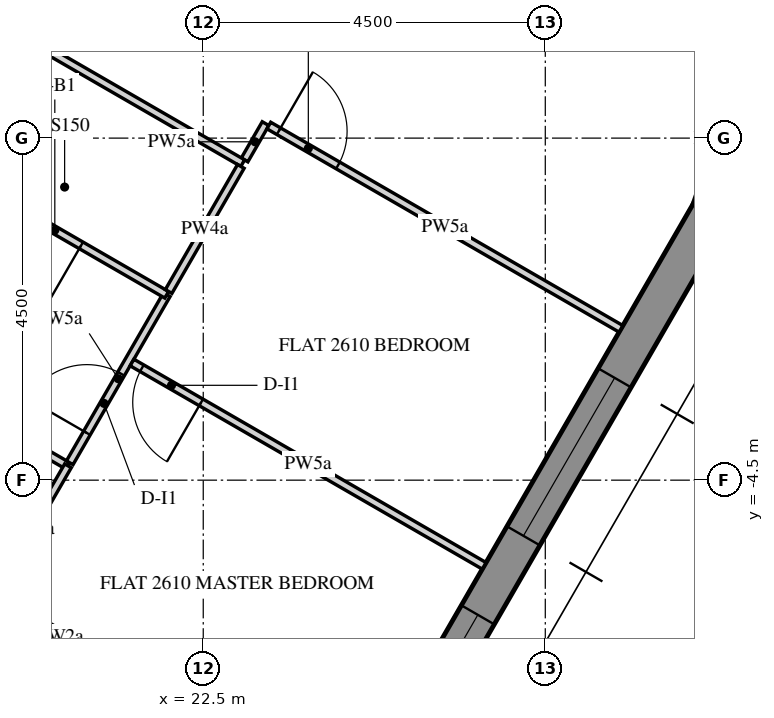
"""IFC4 building model, lengths in metres.
Left out: names, types, materials, properties, quantities, classifications, styles, units other than length and angle.
Written with IfcOpenShell. Run it as: python <this file> out.ifc"""

import sys

from ifc_helpers import new_model, si_unit, direction, frame, frame_2d, origin, place, context, subcontext, project, spatial, polyline, rectangle, outline, extrude, element, fill, save


model = new_model("IFC4")
c1 = context("Model", 3, precision=1e-05, world=origin(), true_north=direction((0.0, 1.0)))
c2 = subcontext(c1, "Body", "Model", "MODEL_VIEW")
j1 = project(units=[si_unit("LENGTHUNIT", "METRE"), si_unit("PLANEANGLEUNIT", "RADIAN")], contexts=[c1])
p1 = place(None, origin())
s1 = spatial("IfcSite", under=j1, at=p1, CompositionType="ELEMENT")
p2 = place(p1, origin())
s2 = spatial("IfcBuilding", under=s1, at=p2, CompositionType="ELEMENT")
p3 = place(p2, frame((0.0, 0.0, 334.2)))
s3 = spatial("IfcBuildingStorey", under=s2, at=p3, CompositionType="ELEMENT", Elevation=334.2)
p4 = place(p3, frame((16.451, -23.005, -0.15), z_axis=(0.0, 0.0, 1.0), x_axis=(0.500003737743, 0.866023245787, 0.0)))
e1 = element("IfcWall", 1, at=p4, inside=s3, PredefinedType="SOLIDWALL", context=c2, shape_type="SweptSolid", body=[
    extrude(outline(polyline([(-0.021, -0.25), (25.468, -0.25), (25.421, 0.25), (0.021, 0.25), (-0.021, -0.25)])), origin(), (0.0, 0.0, 1.0), 3.75),
])
p5 = place(p4, frame((2.522, 0.0, 0.75)))
e2 = element("IfcOpeningElement", 2, at=p5, cuts=e1, PredefinedType="OPENING", context=c2, shape_type="SweptSolid", body=[
    extrude(rectangle(XDim=2.4, YDim=2.7, at=frame_2d((1.2, 1.35))), frame((0.0, 0.26, 0.0), z_axis=(0.0, -1.0, 0.0), x_axis=(1.0, 0.0, 0.0)), (0.0, 0.0, 1.0), 0.52),
])
p6 = place(p4, frame((6.122, 0.0, 0.75)))
e3 = element("IfcOpeningElement", 3, at=p6, cuts=e1, PredefinedType="OPENING", context=c2, shape_type="SweptSolid", body=[
    extrude(rectangle(XDim=2.4, YDim=2.7, at=frame_2d((1.2, 1.35))), frame((0.0, 0.26, 0.0), z_axis=(0.0, -1.0, 0.0), x_axis=(1.0, 0.0, 0.0)), (0.0, 0.0, 1.0), 0.52),
])
p7 = place(p4, frame((9.722, 0.0, 0.75)))
e4 = element("IfcOpeningElement", 4, at=p7, cuts=e1, PredefinedType="OPENING", context=c2, shape_type="SweptSolid", body=[
    extrude(rectangle(XDim=2.4, YDim=2.7, at=frame_2d((1.2, 1.35))), frame((0.0, 0.26, 0.0), z_axis=(0.0, -1.0, 0.0), x_axis=(1.0, 0.0, 0.0)), (0.0, 0.0, 1.0), 0.52),
])
p8 = place(p4, frame((13.323, 0.0, 0.75)))
e5 = element("IfcOpeningElement", 5, at=p8, cuts=e1, PredefinedType="OPENING", context=c2, shape_type="SweptSolid", body=[
    extrude(rectangle(XDim=2.4, YDim=2.7, at=frame_2d((1.2, 1.35))), frame((0.0, 0.26, 0.0), z_axis=(0.0, -1.0, 0.0), x_axis=(1.0, 0.0, 0.0)), (0.0, 0.0, 1.0), 0.52),
])
p9 = place(p4, frame((16.922, 0.0, 0.75)))
e6 = element("IfcOpeningElement", 6, at=p9, cuts=e1, PredefinedType="OPENING", context=c2, shape_type="SweptSolid", body=[
    extrude(rectangle(XDim=2.4, YDim=2.7, at=frame_2d((1.2, 1.35))), frame((0.0, 0.26, 0.0), z_axis=(0.0, -1.0, 0.0), x_axis=(1.0, 0.0, 0.0)), (0.0, 0.0, 1.0), 0.52),
])
p10 = place(p4, frame((20.522, 0.0, 0.75)))
e7 = element("IfcOpeningElement", 7, at=p10, cuts=e1, PredefinedType="OPENING", context=c2, shape_type="SweptSolid", body=[
    extrude(rectangle(XDim=2.4, YDim=2.7, at=frame_2d((1.2, 1.35))), frame((0.0, 0.26, 0.0), z_axis=(0.0, -1.0, 0.0), x_axis=(1.0, 0.0, 0.0)), (0.0, 0.0, 1.0), 0.52),
])
p11 = place(p3, frame((29.174, -0.97, -0.15), z_axis=(0.0, 0.0, 1.0), x_axis=(0.330961348063, 0.943644311215, 0.0)))
e8 = element("IfcWall", 8, at=p11, inside=s3, PredefinedType="SOLIDWALL", context=c2, shape_type="SweptSolid", body=[
    extrude(outline(polyline([(-0.023, -0.25), (1.435, -0.25), (1.341, 0.25), (0.023, 0.25), (-0.023, -0.25)])), origin(), (0.0, 0.0, 1.0), 3.75),
])
p12 = place(p3, frame((24.396, -8.745, 0.0), z_axis=(0.0, 0.0, 1.0), x_axis=(-0.866018297078, 0.500012308975, 0.0)))
e9 = element("IfcWall", 9, at=p12, inside=s3, PredefinedType="PARTITIONING", context=c2, shape_type="SweptSolid", body=[
    extrude(rectangle(XDim=8.725, YDim=0.18, at=frame_2d((4.362, 0.0))), origin(), (0.0, 0.0, 1.0), 2.838),
])
p13 = place(p3, frame((23.043, -0.287, 0.0), z_axis=(0.0, 0.0, 1.0), x_axis=(0.500181810019, 0.865920410272, 0.0)))
e10 = element("IfcWall", 10, at=p13, inside=s3, PredefinedType="PARTITIONING", context=c2, shape_type="SweptSolid", body=[
    extrude(rectangle(XDim=0.552, YDim=0.1, at=frame_2d((0.276, 0.0))), origin(), (0.0, 0.0, 1.0), 2.838),
])
p14 = place(p3, frame((23.363, 0.166, 0.0), z_axis=(0.0, 0.0, 1.0), x_axis=(0.866024483152, -0.500001594578, 0.0)))
e11 = element("IfcWall", 11, at=p14, inside=s3, PredefinedType="PARTITIONING", context=c2, shape_type="SweptSolid", body=[
    extrude(rectangle(XDim=5.35, YDim=0.1, at=frame_2d((2.675, 0.0))), origin(), (0.0, 0.0, 1.0), 2.838),
])
p15 = place(p14, frame((0.15, 0.0, 0.0)))
e12 = element("IfcOpeningElement", 12, at=p15, cuts=e11, PredefinedType="OPENING", context=c2, shape_type="SweptSolid", body=[
    extrude(rectangle(XDim=0.9, YDim=2.1, at=frame_2d((0.45, 1.05))), frame((0.0, 0.06, 0.0), z_axis=(0.0, -1.0, 0.0), x_axis=(1.0, 0.0, 0.0)), (0.0, 0.0, 1.0), 0.12),
])
p16 = place(p3, frame((14.896, 4.361, 0.0), z_axis=(0.0, 0.0, 1.0), x_axis=(0.866020874699, -0.500007844523, 0.0)))
e13 = element("IfcWall", 13, at=p16, inside=s3, PredefinedType="PARTITIONING", context=c2, shape_type="SweptSolid", body=[
    extrude(rectangle(XDim=9.38, YDim=0.1, at=frame_2d((4.69, 0.0))), origin(), (0.0, 0.0, 1.0), 2.838),
])
p17 = place(p3, frame((17.84, -2.65, 0.0), z_axis=(0.0, 0.0, 1.0), x_axis=(0.866002163101, -0.500040251884, 0.0)))
e14 = element("IfcWall", 14, at=p17, inside=s3, PredefinedType="PARTITIONING", context=c2, shape_type="SweptSolid", body=[
    extrude(rectangle(XDim=3.325, YDim=0.1, at=frame_2d((1.663, 0.0))), origin(), (0.0, 0.0, 1.0), 2.838),
])
p18 = place(p17, frame((1.225, 0.0, 0.0)))
e15 = element("IfcOpeningElement", 15, at=p18, cuts=e14, PredefinedType="OPENING", context=c2, shape_type="SweptSolid", body=[
    extrude(rectangle(XDim=0.8, YDim=2.1, at=frame_2d((0.4, 1.05))), frame((0.0, 0.06, 0.0), z_axis=(0.0, -1.0, 0.0), x_axis=(1.0, 0.0, 0.0)), (0.0, 0.0, 1.0), 0.12),
])
p19 = place(p3, frame((20.743, -4.271, 0.0), z_axis=(0.0, 0.0, 1.0), x_axis=(0.500014808323, 0.866016854026, 0.0)))
e16 = element("IfcWall", 16, at=p19, inside=s3, PredefinedType="PARTITIONING", context=c2, shape_type="SweptSolid", body=[
    extrude(rectangle(XDim=2.554, YDim=0.1, at=frame_2d((1.277, 0.0))), origin(), (0.0, 0.0, 1.0), 2.838),
])
p20 = place(p19, frame((0.452, 0.0, 0.0)))
e17 = element("IfcOpeningElement", 17, at=p20, cuts=e16, PredefinedType="OPENING", context=c2, shape_type="SweptSolid", body=[
    extrude(rectangle(XDim=0.9, YDim=2.1, at=frame_2d((0.45, 1.05))), frame((0.0, 0.06, 0.0), z_axis=(0.0, -1.0, 0.0), x_axis=(1.0, 0.0, 0.0)), (0.0, 0.0, 1.0), 0.12),
])
p21 = place(p3, frame((22.02, -2.061, 0.0), z_axis=(0.0, 0.0, 1.0), x_axis=(-0.866041630335, 0.499971893737, 0.0)))
e18 = element("IfcWall", 18, at=p21, inside=s3, PredefinedType="PARTITIONING", context=c2, shape_type="SweptSolid", body=[
    extrude(rectangle(XDim=5.309, YDim=0.1, at=frame_2d((2.655, 0.0))), origin(), (0.0, 0.0, 1.0), 2.838),
])
p22 = place(p21, frame((1.3, 0.0, 0.0)))
e19 = element("IfcOpeningElement", 19, at=p22, cuts=e18, PredefinedType="OPENING", context=c2, shape_type="SweptSolid", body=[
    extrude(rectangle(XDim=0.8, YDim=2.1, at=frame_2d((0.4, 1.05))), frame((0.0, 0.06, 0.0), z_axis=(0.0, -1.0, 0.0), x_axis=(1.0, 0.0, 0.0)), (0.0, 0.0, 1.0), 0.12),
])
p23 = place(p3, frame((19.764, -5.967, 0.0), z_axis=(0.0, 0.0, 1.0), x_axis=(0.500039310002, 0.866002706955, 0.0)))
e20 = element("IfcWall", 20, at=p23, inside=s3, PredefinedType="PARTITIONING", context=c2, shape_type="SweptSolid", body=[
    extrude(rectangle(XDim=1.912, YDim=0.1, at=frame_2d((0.956, 0.0))), origin(), (0.0, 0.0, 1.0), 2.838),
])
p24 = place(p3, frame((26.196, -5.627, 0.0), z_axis=(0.0, 0.0, 1.0), x_axis=(-0.866024483152, 0.500001594578, 0.0)))
e21 = element("IfcWall", 21, at=p24, inside=s3, PredefinedType="PARTITIONING", context=c2, shape_type="SweptSolid", body=[
    extrude(rectangle(XDim=5.35, YDim=0.1, at=frame_2d((2.675, 0.0))), origin(), (0.0, 0.0, 1.0), 2.838),
])
p25 = place(p24, frame((4.3, 0.0, 0.0)))
e22 = element("IfcOpeningElement", 22, at=p25, cuts=e21, PredefinedType="OPENING", context=c2, shape_type="SweptSolid", body=[
    extrude(rectangle(XDim=0.9, YDim=2.1, at=frame_2d((0.45, 1.05))), frame((0.0, 0.06, 0.0), z_axis=(0.0, -1.0, 0.0), x_axis=(1.0, 0.0, 0.0)), (0.0, 0.0, 1.0), 0.12),
])
p26 = place(p3, frame((22.995, -0.372, 0.0), z_axis=(0.0, 0.0, 1.0), x_axis=(-0.500063520245, -0.865988727248, 0.0)))
e23 = element("IfcWall", 23, at=p26, inside=s3, PredefinedType="PARTITIONING", context=c2, shape_type="SweptSolid", body=[
    extrude(rectangle(XDim=1.9, YDim=0.1, at=frame_2d((0.95, 0.0))), origin(), (0.0, 0.0, 1.0), 2.838),
])
p27 = place(p9, frame((0.0, 0.18, 0.0)))
e24 = element("IfcWindow", 24, at=p27, inside=s3, PartitioningType="DOUBLE_PANEL_VERTICAL", PredefinedType="WINDOW", context=c2, shape_type="SweptSolid", body=[
    extrude(rectangle(XDim=2.4, YDim=2.7, at=frame_2d((1.2, 1.35))), frame((0.0, 0.03, 0.0), z_axis=(0.0, -1.0, 0.0), x_axis=(1.0, 0.0, 0.0)), (0.0, 0.0, 1.0), 0.06),
])
fill(e6, e24)
p28 = place(p10, frame((0.0, 0.18, 0.0)))
e25 = element("IfcWindow", 25, at=p28, inside=s3, PartitioningType="DOUBLE_PANEL_VERTICAL", PredefinedType="WINDOW", context=c2, shape_type="SweptSolid", body=[
    extrude(rectangle(XDim=2.4, YDim=2.7, at=frame_2d((1.2, 1.35))), frame((0.0, 0.03, 0.0), z_axis=(0.0, -1.0, 0.0), x_axis=(1.0, 0.0, 0.0)), (0.0, 0.0, 1.0), 0.06),
])
fill(e7, e25)
p29 = place(p20, origin())
e26 = element("IfcDoor", 26, at=p29, inside=s3, OperationType="SINGLE_SWING_LEFT", PredefinedType="DOOR", context=c2, shape_type="SweptSolid", body=[
    extrude(rectangle(XDim=0.9, YDim=2.1, at=frame_2d((0.45, 1.05))), frame((0.0, 0.025, 0.0), z_axis=(0.0, -1.0, 0.0), x_axis=(1.0, 0.0, 0.0)), (0.0, 0.0, 1.0), 0.05),
])
fill(e17, e26)
p30 = place(p25, origin())
e27 = element("IfcDoor", 27, at=p30, inside=s3, OperationType="SINGLE_SWING_RIGHT", PredefinedType="DOOR", context=c2, shape_type="SweptSolid", body=[
    extrude(rectangle(XDim=0.9, YDim=2.1, at=frame_2d((0.45, 1.05))), frame((0.0, 0.025, 0.0), z_axis=(0.0, -1.0, 0.0), x_axis=(1.0, 0.0, 0.0)), (0.0, 0.0, 1.0), 0.05),
])
fill(e22, e27)
p31 = place(p15, origin())
e28 = element("IfcDoor", 28, at=p31, inside=s3, OperationType="SINGLE_SWING_RIGHT", PredefinedType="DOOR", context=c2, shape_type="SweptSolid", body=[
    extrude(rectangle(XDim=0.9, YDim=2.1, at=frame_2d((0.45, 1.05))), frame((0.0, 0.025, 0.0), z_axis=(0.0, -1.0, 0.0), x_axis=(1.0, 0.0, 0.0)), (0.0, 0.0, 1.0), 0.05),
])
fill(e12, e28)
p32 = place(p22, origin())
e29 = element("IfcDoor", 29, at=p32, inside=s3, OperationType="SINGLE_SWING_RIGHT", PredefinedType="DOOR", context=c2, shape_type="SweptSolid", body=[
    extrude(rectangle(XDim=0.8, YDim=2.1, at=frame_2d((0.4, 1.05))), frame((0.0, 0.025, 0.0), z_axis=(0.0, -1.0, 0.0), x_axis=(1.0, 0.0, 0.0)), (0.0, 0.0, 1.0), 0.05),
])
fill(e19, e29)
save(model, sys.argv[1])
